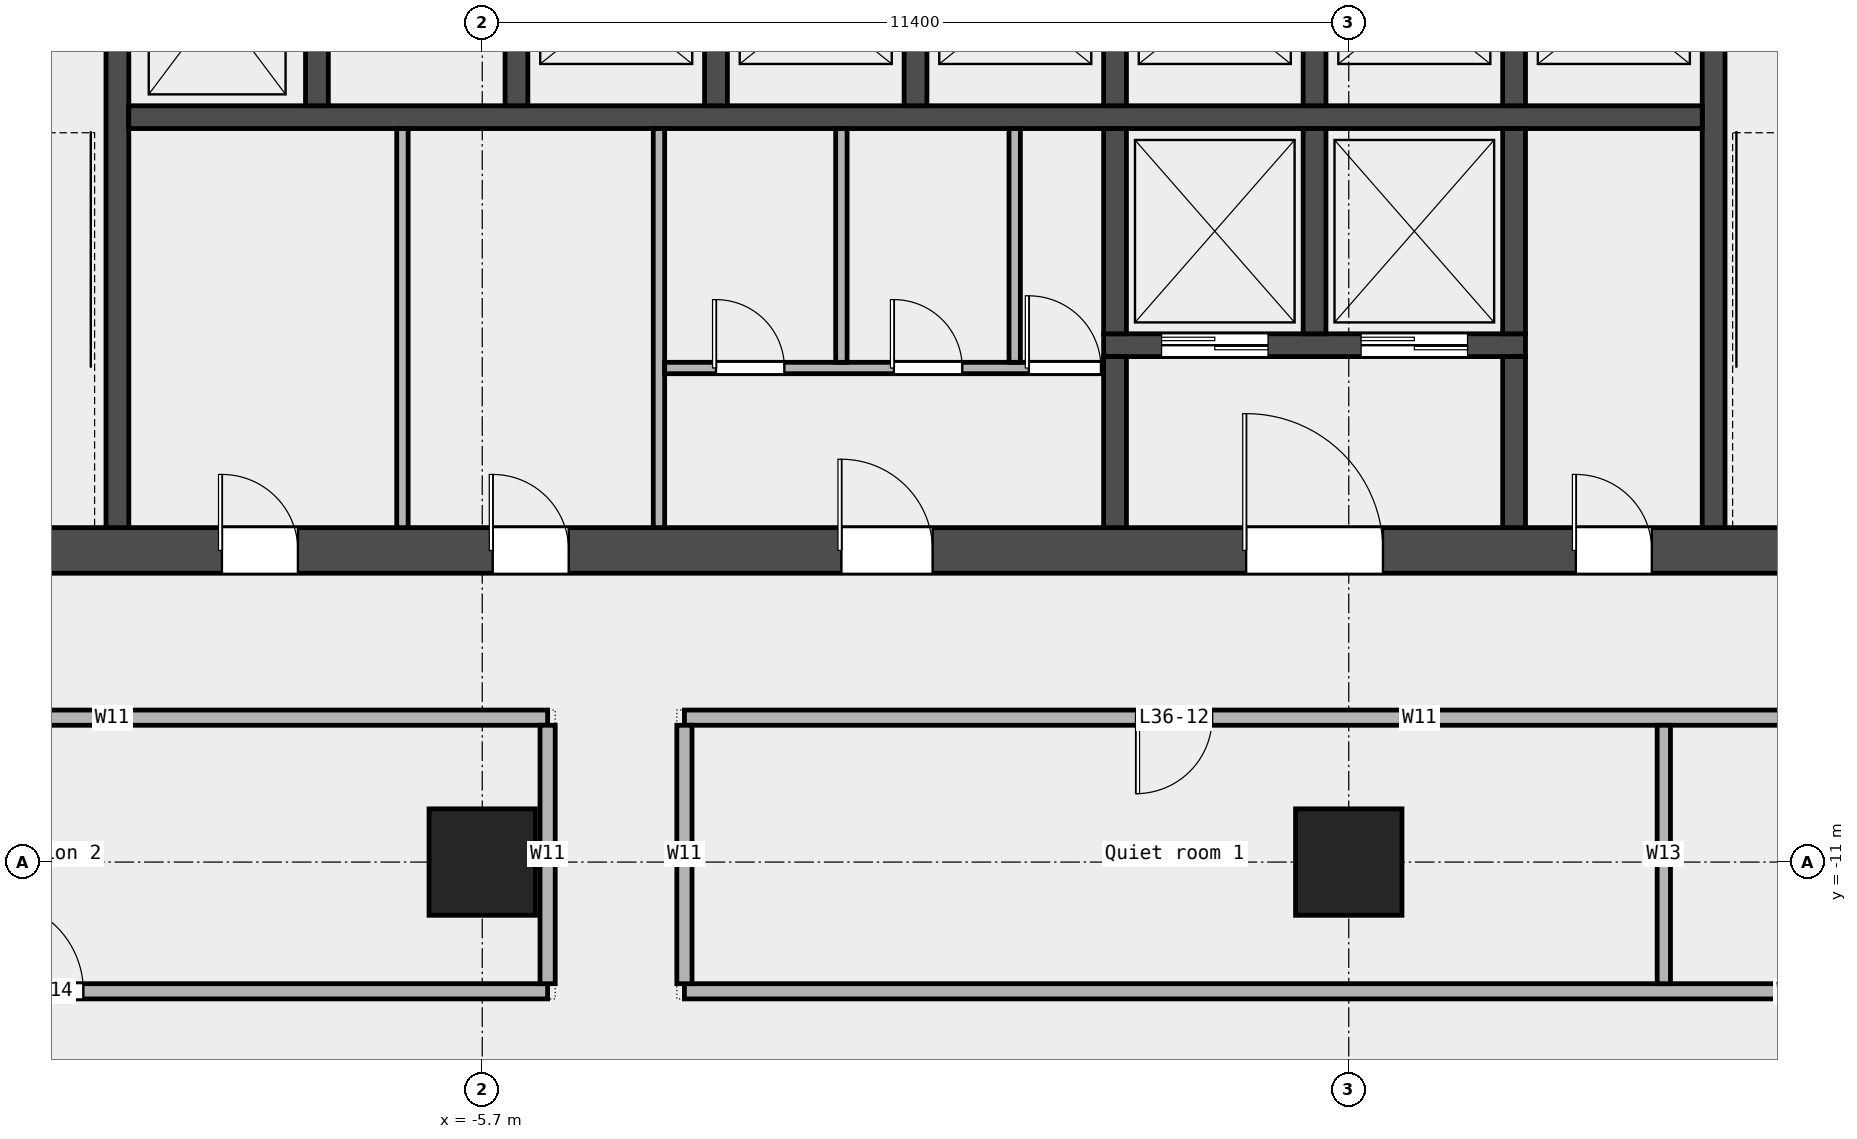
"""IFC4 building model, lengths in metres.
Left out: names, types, materials, properties, quantities, classifications, styles, units other than length and angle.
Written with IfcOpenShell. Run it as: python <this file> out.ifc"""

import sys

from ifc_helpers import new_model, si_unit, direction, frame, frame_2d, origin, origin_2d, place, context, subcontext, project, spatial, rectangle, extrude, element, fill, save


model = new_model("IFC4")
c1 = context("Model", 3, precision=1e-05, world=origin(), true_north=direction((0.0, 1.0)))
c2 = subcontext(c1, "Body", "Model", "MODEL_VIEW")
j1 = project(units=[si_unit("LENGTHUNIT", "METRE"), si_unit("PLANEANGLEUNIT", "RADIAN")], contexts=[c1])
p1 = place(None, origin())
s1 = spatial("IfcSite", under=j1, at=p1, CompositionType="ELEMENT")
p2 = place(p1, origin())
s2 = spatial("IfcBuilding", under=s1, at=p2, CompositionType="ELEMENT")
p3 = place(p2, frame((0.0, 0.0, 177.0)))
s3 = spatial("IfcBuildingStorey", under=s2, at=p3, CompositionType="ELEMENT", Elevation=177.0)
for number, where, z_axis, x_axis in (
    (1, (-5.7, -11.0, 0.0), (0.0, 0.0, 1.0), (1.0, 0.0, 0.0)),
    (2, (5.7, -11.0, 0.0), (0.0, 0.0, 1.0), (1.0, 0.0, 0.0)),
):
    element("IfcColumn", number, at=place(p3, frame(where, z_axis=z_axis, x_axis=x_axis)), inside=s3, PredefinedType="COLUMN", context=c2, shape_type="SweptSolid", body=[
        extrude(rectangle(XDim=1.4, YDim=1.4, at=origin_2d()), origin(), (0.0, 0.0, 1.0), 3.6),
    ])
p4 = place(p3, frame((-26.15, -12.7, 0.0), z_axis=(0.0, 0.0, 1.0), x_axis=(1.0, 0.0, 0.0)))
e3 = element("IfcWall", 3, at=p4, inside=s3, PredefinedType="PARTITIONING", context=c2, shape_type="SweptSolid", body=[
    extrude(rectangle(XDim=21.31, YDim=0.2, at=frame_2d((10.655, 0.0))), origin(), (0.0, 0.0, 1.0), 3.6),
])
p5 = place(p4, frame((3.597, 0.0, 0.0)))
e4 = element("IfcOpeningElement", 4, at=p5, cuts=e3, PredefinedType="OPENING", context=c2, shape_type="SweptSolid", body=[
    extrude(rectangle(XDim=0.9, YDim=2.1, at=frame_2d((0.45, 1.05))), frame((0.0, 0.112, 0.0), z_axis=(0.0, -1.0, 0.0), x_axis=(1.0, 0.0, 0.0)), (0.0, 0.0, 1.0), 0.224),
])
p6 = place(p4, frame((14.002, 0.0, 0.0)))
e5 = element("IfcOpeningElement", 5, at=p6, cuts=e3, PredefinedType="OPENING", context=c2, shape_type="SweptSolid", body=[
    extrude(rectangle(XDim=1.2, YDim=2.1, at=frame_2d((0.6, 1.05))), frame((0.0, 0.112, 0.0), z_axis=(0.0, -1.0, 0.0), x_axis=(1.0, 0.0, 0.0)), (0.0, 0.0, 1.0), 0.224),
])
p7 = place(p3, frame((-3.04, -12.7, 0.0), z_axis=(0.0, 0.0, 1.0), x_axis=(1.0, 0.0, 0.0)))
e6 = element("IfcWall", 6, at=p7, inside=s3, PredefinedType="PARTITIONING", context=c2, shape_type="SweptSolid", body=[
    extrude(rectangle(XDim=29.19, YDim=0.2, at=frame_2d((14.595, 0.0))), origin(), (0.0, 0.0, 1.0), 3.6),
])
p8 = place(p7, frame((20.938, 0.0, 0.0)))
e7 = element("IfcOpeningElement", 7, at=p8, cuts=e6, PredefinedType="OPENING", context=c2, shape_type="SweptSolid", body=[
    extrude(rectangle(XDim=1.2, YDim=2.1, at=frame_2d((0.6, 1.05))), frame((0.0, 0.112, 0.0), z_axis=(0.0, -1.0, 0.0), x_axis=(1.0, 0.0, 0.0)), (0.0, 0.0, 1.0), 0.224),
])
p9 = place(p3, frame((-16.3, -9.1, 0.0), z_axis=(0.0, 0.0, 1.0), x_axis=(1.0, 0.0, 0.0)))
e8 = element("IfcWall", 8, at=p9, inside=s3, PredefinedType="PARTITIONING", context=c2, shape_type="SweptSolid", body=[
    extrude(rectangle(XDim=11.46, YDim=0.2, at=frame_2d((5.73, 0.0))), origin(), (0.0, 0.0, 1.0), 3.6),
])
p10 = place(p3, frame((-3.04, -9.1, 0.0), z_axis=(0.0, 0.0, 1.0), x_axis=(1.0, 0.0, 0.0)))
e9 = element("IfcWall", 9, at=p10, inside=s3, PredefinedType="PARTITIONING", context=c2, shape_type="SweptSolid", body=[
    extrude(rectangle(XDim=19.34, YDim=0.2, at=frame_2d((9.67, 0.0))), origin(), (0.0, 0.0, 1.0), 3.6),
])
p11 = place(p10, frame((5.942, 0.0, 0.0)))
e10 = element("IfcOpeningElement", 10, at=p11, cuts=e9, PredefinedType="OPENING", context=c2, shape_type="SweptSolid", body=[
    extrude(rectangle(XDim=1.0, YDim=2.1, at=frame_2d((0.5, 1.05))), frame((0.0, 0.112, 0.0), z_axis=(0.0, -1.0, 0.0), x_axis=(1.0, 0.0, 0.0)), (0.0, 0.0, 1.0), 0.224),
])
for number, where, z_axis, x_axis in (
    (11, (-4.84, -12.6, 0.0), (0.0, 0.0, 1.0), (0.0, 1.0, 0.0)),
    (12, (-3.04, -12.6, 0.0), (0.0, 0.0, 1.0), (0.0, 1.0, 0.0)),
):
    element("IfcWall", number, at=place(p3, frame(where, z_axis=z_axis, x_axis=x_axis)), inside=s3, PredefinedType="PARTITIONING", context=c2, shape_type="SweptSolid", body=[
        extrude(rectangle(XDim=3.4, YDim=0.2, at=frame_2d((1.7, 0.0))), origin(), (0.0, 0.0, 1.0), 3.6),
    ])
p12 = place(p3, frame((9.845, -12.6, 0.0), z_axis=(0.0, 0.0, 1.0), x_axis=(0.0, 1.0, 0.0)))
e13 = element("IfcWall", 13, at=p12, inside=s3, PredefinedType="PARTITIONING", context=c2, shape_type="SweptSolid", body=[
    extrude(rectangle(XDim=3.4, YDim=0.175, at=frame_2d((1.7, 0.0))), origin(), (0.0, 0.0, 1.0), 3.6),
])
p13 = place(p3, frame((-14.4, -6.9, 0.0), z_axis=(0.0, 0.0, 1.0), x_axis=(1.0, 0.0, 0.0)))
e14 = element("IfcWall", 14, at=p13, inside=s3, PredefinedType="SHEAR", context=c2, shape_type="SweptSolid", body=[
    extrude(rectangle(XDim=28.8, YDim=0.6, at=frame_2d((14.4, 0.0))), origin(), (0.0, 0.0, 1.0), 3.7),
])
p14 = place(p13, frame((5.275, 0.0, 0.0)))
e15 = element("IfcOpeningElement", 15, at=p14, cuts=e14, PredefinedType="OPENING", context=c2, shape_type="SweptSolid", body=[
    extrude(rectangle(XDim=1.0, YDim=2.1, at=frame_2d((0.5, 1.05))), frame((0.0, 0.312, 0.0), z_axis=(0.0, -1.0, 0.0), x_axis=(1.0, 0.0, 0.0)), (0.0, 0.0, 1.0), 0.624),
])
p15 = place(p13, frame((8.837, 0.0, 0.0)))
e16 = element("IfcOpeningElement", 16, at=p15, cuts=e14, PredefinedType="OPENING", context=c2, shape_type="SweptSolid", body=[
    extrude(rectangle(XDim=1.0, YDim=2.1, at=frame_2d((0.5, 1.05))), frame((0.0, 0.312, 0.0), z_axis=(0.0, -1.0, 0.0), x_axis=(1.0, 0.0, 0.0)), (0.0, 0.0, 1.0), 0.624),
])
p16 = place(p13, frame((13.425, 0.0, 0.0)))
e17 = element("IfcOpeningElement", 17, at=p16, cuts=e14, PredefinedType="OPENING", context=c2, shape_type="SweptSolid", body=[
    extrude(rectangle(XDim=1.2, YDim=2.1, at=frame_2d((0.6, 1.05))), frame((0.0, 0.312, 0.0), z_axis=(0.0, -1.0, 0.0), x_axis=(1.0, 0.0, 0.0)), (0.0, 0.0, 1.0), 0.624),
])
p17 = place(p13, frame((18.75, 0.0, 0.0)))
e18 = element("IfcOpeningElement", 18, at=p17, cuts=e14, PredefinedType="OPENING", context=c2, shape_type="SweptSolid", body=[
    extrude(rectangle(XDim=1.8, YDim=2.1, at=frame_2d((0.9, 1.05))), frame((0.0, 0.312, 0.0), z_axis=(0.0, -1.0, 0.0), x_axis=(1.0, 0.0, 0.0)), (0.0, 0.0, 1.0), 0.624),
])
p18 = place(p13, frame((23.087, 0.0, 0.0)))
e19 = element("IfcOpeningElement", 19, at=p18, cuts=e14, PredefinedType="OPENING", context=c2, shape_type="SweptSolid", body=[
    extrude(rectangle(XDim=1.0, YDim=2.1, at=frame_2d((0.5, 1.05))), frame((0.0, 0.312, 0.0), z_axis=(0.0, -1.0, 0.0), x_axis=(1.0, 0.0, 0.0)), (0.0, 0.0, 1.0), 0.624),
])
for number, where, z_axis, x_axis in (
    (20, (-10.5, -6.6, 0.0), (0.0, 0.0, 1.0), (0.0, 1.0, 0.0)),
    (21, (10.5, -6.6, 0.0), (0.0, 0.0, 1.0), (0.0, 1.0, 0.0)),
):
    element("IfcWall", number, at=place(p3, frame(where, z_axis=z_axis, x_axis=x_axis)), inside=s3, PredefinedType="SHEAR", context=c2, shape_type="SweptSolid", body=[
        extrude(rectangle(XDim=8.55, YDim=0.3, at=frame_2d((4.275, 0.0))), origin(), (0.0, 0.0, 1.0), 3.7),
    ])
p19 = place(p3, frame((-10.35, -1.2, 0.0), z_axis=(0.0, 0.0, 1.0), x_axis=(1.0, 0.0, 0.0)))
e22 = element("IfcWall", 22, at=p19, inside=s3, PredefinedType="SOLIDWALL", context=c2, shape_type="SweptSolid", body=[
    extrude(rectangle(XDim=20.7, YDim=0.3, at=frame_2d((10.35, 0.0))), origin(), (0.0, 0.0, 1.0), 3.7),
])
for number, where, z_axis, x_axis in (
    (23, (-7.875, -1.05, 0.0), (0.0, 0.0, 1.0), (0.0, 1.0, 0.0)),
    (24, (-5.25, -1.05, 0.0), (0.0, 0.0, 1.0), (0.0, 1.0, 0.0)),
    (25, (-2.625, -1.05, 0.0), (0.0, 0.0, 1.0), (0.0, 1.0, 0.0)),
    (26, (0.0, -1.05, 0.0), (0.0, 0.0, 1.0), (0.0, 1.0, 0.0)),
    (27, (2.625, -1.05, 0.0), (0.0, 0.0, 1.0), (0.0, 1.0, 0.0)),
    (28, (5.25, -1.05, 0.0), (0.0, 0.0, 1.0), (0.0, 1.0, 0.0)),
    (29, (7.875, -1.05, 0.0), (0.0, 0.0, 1.0), (0.0, 1.0, 0.0)),
):
    element("IfcWall", number, at=place(p3, frame(where, z_axis=z_axis, x_axis=x_axis)), inside=s3, PredefinedType="SOLIDWALL", context=c2, shape_type="SweptSolid", body=[
        extrude(rectangle(XDim=2.7, YDim=0.3, at=frame_2d((1.35, 0.0))), origin(), (0.0, 0.0, 1.0), 3.7),
    ])
p20 = place(p3, frame((2.475, -4.2, 0.0), z_axis=(0.0, 0.0, 1.0), x_axis=(1.0, 0.0, 0.0)))
e30 = element("IfcWall", 30, at=p20, inside=s3, PredefinedType="SOLIDWALL", context=c2, shape_type="SweptSolid", body=[
    extrude(rectangle(XDim=5.55, YDim=0.3, at=frame_2d((2.775, 0.0))), origin(), (0.0, 0.0, 1.0), 3.7),
])
p21 = place(p20, frame((0.762, 0.0, 0.0)))
e31 = element("IfcOpeningElement", 31, at=p21, cuts=e30, PredefinedType="OPENING", context=c2, shape_type="SweptSolid", body=[
    extrude(rectangle(XDim=1.4, YDim=2.1, at=frame_2d((0.7, 1.05))), frame((0.0, 0.162, 0.0), z_axis=(0.0, -1.0, 0.0), x_axis=(1.0, 0.0, 0.0)), (0.0, 0.0, 1.0), 0.324),
])
p22 = place(p20, frame((3.387, 0.0, 0.0)))
e32 = element("IfcOpeningElement", 32, at=p22, cuts=e30, PredefinedType="OPENING", context=c2, shape_type="SweptSolid", body=[
    extrude(rectangle(XDim=1.4, YDim=2.1, at=frame_2d((0.7, 1.05))), frame((0.0, 0.162, 0.0), z_axis=(0.0, -1.0, 0.0), x_axis=(1.0, 0.0, 0.0)), (0.0, 0.0, 1.0), 0.324),
])
p23 = place(p3, frame((2.625, -4.05, 0.0), z_axis=(0.0, 0.0, 1.0), x_axis=(0.0, 1.0, 0.0)))
e33 = element("IfcWall", 33, at=p23, inside=s3, PredefinedType="SOLIDWALL", context=c2, shape_type="SweptSolid", body=[
    extrude(rectangle(XDim=2.7, YDim=0.3, at=frame_2d((1.35, 0.0))), origin(), (0.0, 0.0, 1.0), 3.7),
])
p24 = place(p3, frame((2.625, -6.6, 0.0), z_axis=(0.0, 0.0, 1.0), x_axis=(0.0, 1.0, 0.0)))
e34 = element("IfcWall", 34, at=p24, inside=s3, PredefinedType="SOLIDWALL", context=c2, shape_type="SweptSolid", body=[
    extrude(rectangle(XDim=2.25, YDim=0.3, at=frame_2d((1.125, 0.0))), origin(), (0.0, 0.0, 1.0), 3.7),
])
for number, where, z_axis, x_axis in (
    (35, (5.25, -4.05, 0.0), (0.0, 0.0, 1.0), (0.0, 1.0, 0.0)),
    (36, (7.875, -4.05, 0.0), (0.0, 0.0, 1.0), (0.0, 1.0, 0.0)),
):
    element("IfcWall", number, at=place(p3, frame(where, z_axis=z_axis, x_axis=x_axis)), inside=s3, PredefinedType="SOLIDWALL", context=c2, shape_type="SweptSolid", body=[
        extrude(rectangle(XDim=2.7, YDim=0.3, at=frame_2d((1.35, 0.0))), origin(), (0.0, 0.0, 1.0), 3.7),
    ])
p25 = place(p3, frame((7.875, -6.6, 0.0), z_axis=(0.0, 0.0, 1.0), x_axis=(0.0, 1.0, 0.0)))
e37 = element("IfcWall", 37, at=p25, inside=s3, PredefinedType="SOLIDWALL", context=c2, shape_type="SweptSolid", body=[
    extrude(rectangle(XDim=2.25, YDim=0.3, at=frame_2d((1.125, 0.0))), origin(), (0.0, 0.0, 1.0), 3.7),
])
for number, where, z_axis, x_axis in (
    (38, (-6.75, -6.6, 0.0), (0.0, 0.0, 1.0), (0.0, 1.0, 0.0)),
    (39, (-3.375, -6.6, 0.0), (0.0, 0.0, 1.0), (0.0, 1.0, 0.0)),
):
    element("IfcWall", number, at=place(p3, frame(where, z_axis=z_axis, x_axis=x_axis)), inside=s3, PredefinedType="PARTITIONING", context=c2, shape_type="SweptSolid", body=[
        extrude(rectangle(XDim=5.25, YDim=0.15, at=frame_2d((2.625, 0.0))), origin(), (0.0, 0.0, 1.0), 3.7),
    ])
p26 = place(p3, frame((-3.3, -4.5, 0.0), z_axis=(0.0, 0.0, 1.0), x_axis=(1.0, 0.0, 0.0)))
e40 = element("IfcWall", 40, at=p26, inside=s3, PredefinedType="PARTITIONING", context=c2, shape_type="SweptSolid", body=[
    extrude(rectangle(XDim=5.775, YDim=0.15, at=frame_2d((2.888, 0.0))), origin(), (0.0, 0.0, 1.0), 3.7),
])
p27 = place(p26, frame((0.675, 0.0, 0.0)))
e41 = element("IfcOpeningElement", 41, at=p27, cuts=e40, PredefinedType="OPENING", context=c2, shape_type="SweptSolid", body=[
    extrude(rectangle(XDim=0.9, YDim=2.1, at=frame_2d((0.45, 1.05))), frame((0.0, 0.087, 0.0), z_axis=(0.0, -1.0, 0.0), x_axis=(1.0, 0.0, 0.0)), (0.0, 0.0, 1.0), 0.174),
])
p28 = place(p26, frame((3.015, 0.0, 0.0)))
e42 = element("IfcOpeningElement", 42, at=p28, cuts=e40, PredefinedType="OPENING", context=c2, shape_type="SweptSolid", body=[
    extrude(rectangle(XDim=0.9, YDim=2.1, at=frame_2d((0.45, 1.05))), frame((0.0, 0.087, 0.0), z_axis=(0.0, -1.0, 0.0), x_axis=(1.0, 0.0, 0.0)), (0.0, 0.0, 1.0), 0.174),
])
p29 = place(p26, frame((4.79, 0.0, 0.0)))
e43 = element("IfcOpeningElement", 43, at=p29, cuts=e40, PredefinedType="OPENING", context=c2, shape_type="SweptSolid", body=[
    extrude(rectangle(XDim=0.95, YDim=2.1, at=frame_2d((0.475, 1.05))), frame((0.0, 0.087, 0.0), z_axis=(0.0, -1.0, 0.0), x_axis=(1.0, 0.0, 0.0)), (0.0, 0.0, 1.0), 0.174),
])
for number, where, z_axis, x_axis in (
    (44, (-0.975, -4.425, 0.0), (0.0, 0.0, 1.0), (0.0, 1.0, 0.0)),
    (45, (1.305, -4.425, 0.0), (0.0, 0.0, 1.0), (0.0, 1.0, 0.0)),
):
    element("IfcWall", number, at=place(p3, frame(where, z_axis=z_axis, x_axis=x_axis)), inside=s3, PredefinedType="PARTITIONING", context=c2, shape_type="SweptSolid", body=[
        extrude(rectangle(XDim=3.075, YDim=0.15, at=frame_2d((1.538, 0.0))), origin(), (0.0, 0.0, 1.0), 3.7),
    ])
p30 = place(p11, origin())
e46 = element("IfcDoor", 46, at=p30, inside=s3, OperationType="SINGLE_SWING_RIGHT", PredefinedType="DOOR", context=c2, shape_type="SweptSolid", body=[
    extrude(rectangle(XDim=1.0, YDim=2.1, at=frame_2d((0.5, 1.05))), frame((0.0, 0.025, 0.0), z_axis=(0.0, -1.0, 0.0), x_axis=(1.0, 0.0, 0.0)), (0.0, 0.0, 1.0), 0.05),
])
fill(e10, e46)
p31 = place(p6, origin())
e47 = element("IfcDoor", 47, at=p31, inside=s3, OperationType="SINGLE_SWING_LEFT", PredefinedType="DOOR", context=c2, shape_type="SweptSolid", body=[
    extrude(rectangle(XDim=1.2, YDim=2.1, at=frame_2d((0.6, 1.05))), frame((0.0, 0.025, 0.0), z_axis=(0.0, -1.0, 0.0), x_axis=(1.0, 0.0, 0.0)), (0.0, 0.0, 1.0), 0.05),
])
fill(e5, e47)
p32 = place(p21, origin())
e48 = element("IfcDoor", 48, at=p32, inside=s3, OperationType="DOUBLE_DOOR_SLIDING", PredefinedType="DOOR", context=c2, shape_type="SweptSolid", body=[
    extrude(rectangle(XDim=1.4, YDim=2.1, at=frame_2d((0.7, 1.05))), frame((0.0, 0.025, 0.0), z_axis=(0.0, -1.0, 0.0), x_axis=(1.0, 0.0, 0.0)), (0.0, 0.0, 1.0), 0.05),
])
fill(e31, e48)
p33 = place(p22, origin())
e49 = element("IfcDoor", 49, at=p33, inside=s3, OperationType="DOUBLE_DOOR_SLIDING", PredefinedType="DOOR", context=c2, shape_type="SweptSolid", body=[
    extrude(rectangle(XDim=1.4, YDim=2.1, at=frame_2d((0.7, 1.05))), frame((0.0, 0.025, 0.0), z_axis=(0.0, -1.0, 0.0), x_axis=(1.0, 0.0, 0.0)), (0.0, 0.0, 1.0), 0.05),
])
fill(e32, e49)
p34 = place(p14, origin())
e50 = element("IfcDoor", 50, at=p34, inside=s3, OperationType="SINGLE_SWING_LEFT", PredefinedType="DOOR", context=c2, shape_type="SweptSolid", body=[
    extrude(rectangle(XDim=1.0, YDim=2.1, at=frame_2d((0.5, 1.05))), frame((0.0, 0.025, 0.0), z_axis=(0.0, -1.0, 0.0), x_axis=(1.0, 0.0, 0.0)), (0.0, 0.0, 1.0), 0.05),
])
fill(e15, e50)
p35 = place(p15, origin())
e51 = element("IfcDoor", 51, at=p35, inside=s3, OperationType="SINGLE_SWING_LEFT", PredefinedType="DOOR", context=c2, shape_type="SweptSolid", body=[
    extrude(rectangle(XDim=1.0, YDim=2.1, at=frame_2d((0.5, 1.05))), frame((0.0, 0.025, 0.0), z_axis=(0.0, -1.0, 0.0), x_axis=(1.0, 0.0, 0.0)), (0.0, 0.0, 1.0), 0.05),
])
fill(e16, e51)
p36 = place(p16, origin())
e52 = element("IfcDoor", 52, at=p36, inside=s3, OperationType="SINGLE_SWING_LEFT", PredefinedType="DOOR", context=c2, shape_type="SweptSolid", body=[
    extrude(rectangle(XDim=1.2, YDim=2.1, at=frame_2d((0.6, 1.05))), frame((0.0, 0.025, 0.0), z_axis=(0.0, -1.0, 0.0), x_axis=(1.0, 0.0, 0.0)), (0.0, 0.0, 1.0), 0.05),
])
fill(e17, e52)
p37 = place(p27, origin())
e53 = element("IfcDoor", 53, at=p37, inside=s3, OperationType="SINGLE_SWING_LEFT", PredefinedType="DOOR", context=c2, shape_type="SweptSolid", body=[
    extrude(rectangle(XDim=0.9, YDim=2.1, at=frame_2d((0.45, 1.05))), frame((0.0, 0.025, 0.0), z_axis=(0.0, -1.0, 0.0), x_axis=(1.0, 0.0, 0.0)), (0.0, 0.0, 1.0), 0.05),
])
fill(e41, e53)
p38 = place(p28, origin())
e54 = element("IfcDoor", 54, at=p38, inside=s3, OperationType="SINGLE_SWING_LEFT", PredefinedType="DOOR", context=c2, shape_type="SweptSolid", body=[
    extrude(rectangle(XDim=0.9, YDim=2.1, at=frame_2d((0.45, 1.05))), frame((0.0, 0.025, 0.0), z_axis=(0.0, -1.0, 0.0), x_axis=(1.0, 0.0, 0.0)), (0.0, 0.0, 1.0), 0.05),
])
fill(e42, e54)
p39 = place(p29, origin())
e55 = element("IfcDoor", 55, at=p39, inside=s3, OperationType="SINGLE_SWING_LEFT", PredefinedType="DOOR", context=c2, shape_type="SweptSolid", body=[
    extrude(rectangle(XDim=0.95, YDim=2.1, at=frame_2d((0.475, 1.05))), frame((0.0, 0.025, 0.0), z_axis=(0.0, -1.0, 0.0), x_axis=(1.0, 0.0, 0.0)), (0.0, 0.0, 1.0), 0.05),
])
fill(e43, e55)
p40 = place(p17, origin())
e56 = element("IfcDoor", 56, at=p40, inside=s3, OperationType="DOUBLE_DOOR_SINGLE_SWING", PredefinedType="DOOR", context=c2, shape_type="SweptSolid", body=[
    extrude(rectangle(XDim=1.8, YDim=2.1, at=frame_2d((0.9, 1.05))), frame((0.0, 0.025, 0.0), z_axis=(0.0, -1.0, 0.0), x_axis=(1.0, 0.0, 0.0)), (0.0, 0.0, 1.0), 0.05),
])
fill(e18, e56)
p41 = place(p18, origin())
e57 = element("IfcDoor", 57, at=p41, inside=s3, OperationType="SINGLE_SWING_LEFT", PredefinedType="DOOR", context=c2, shape_type="SweptSolid", body=[
    extrude(rectangle(XDim=1.0, YDim=2.1, at=frame_2d((0.5, 1.05))), frame((0.0, 0.025, 0.0), z_axis=(0.0, -1.0, 0.0), x_axis=(1.0, 0.0, 0.0)), (0.0, 0.0, 1.0), 0.05),
])
fill(e19, e57)
save(model, sys.argv[1])
